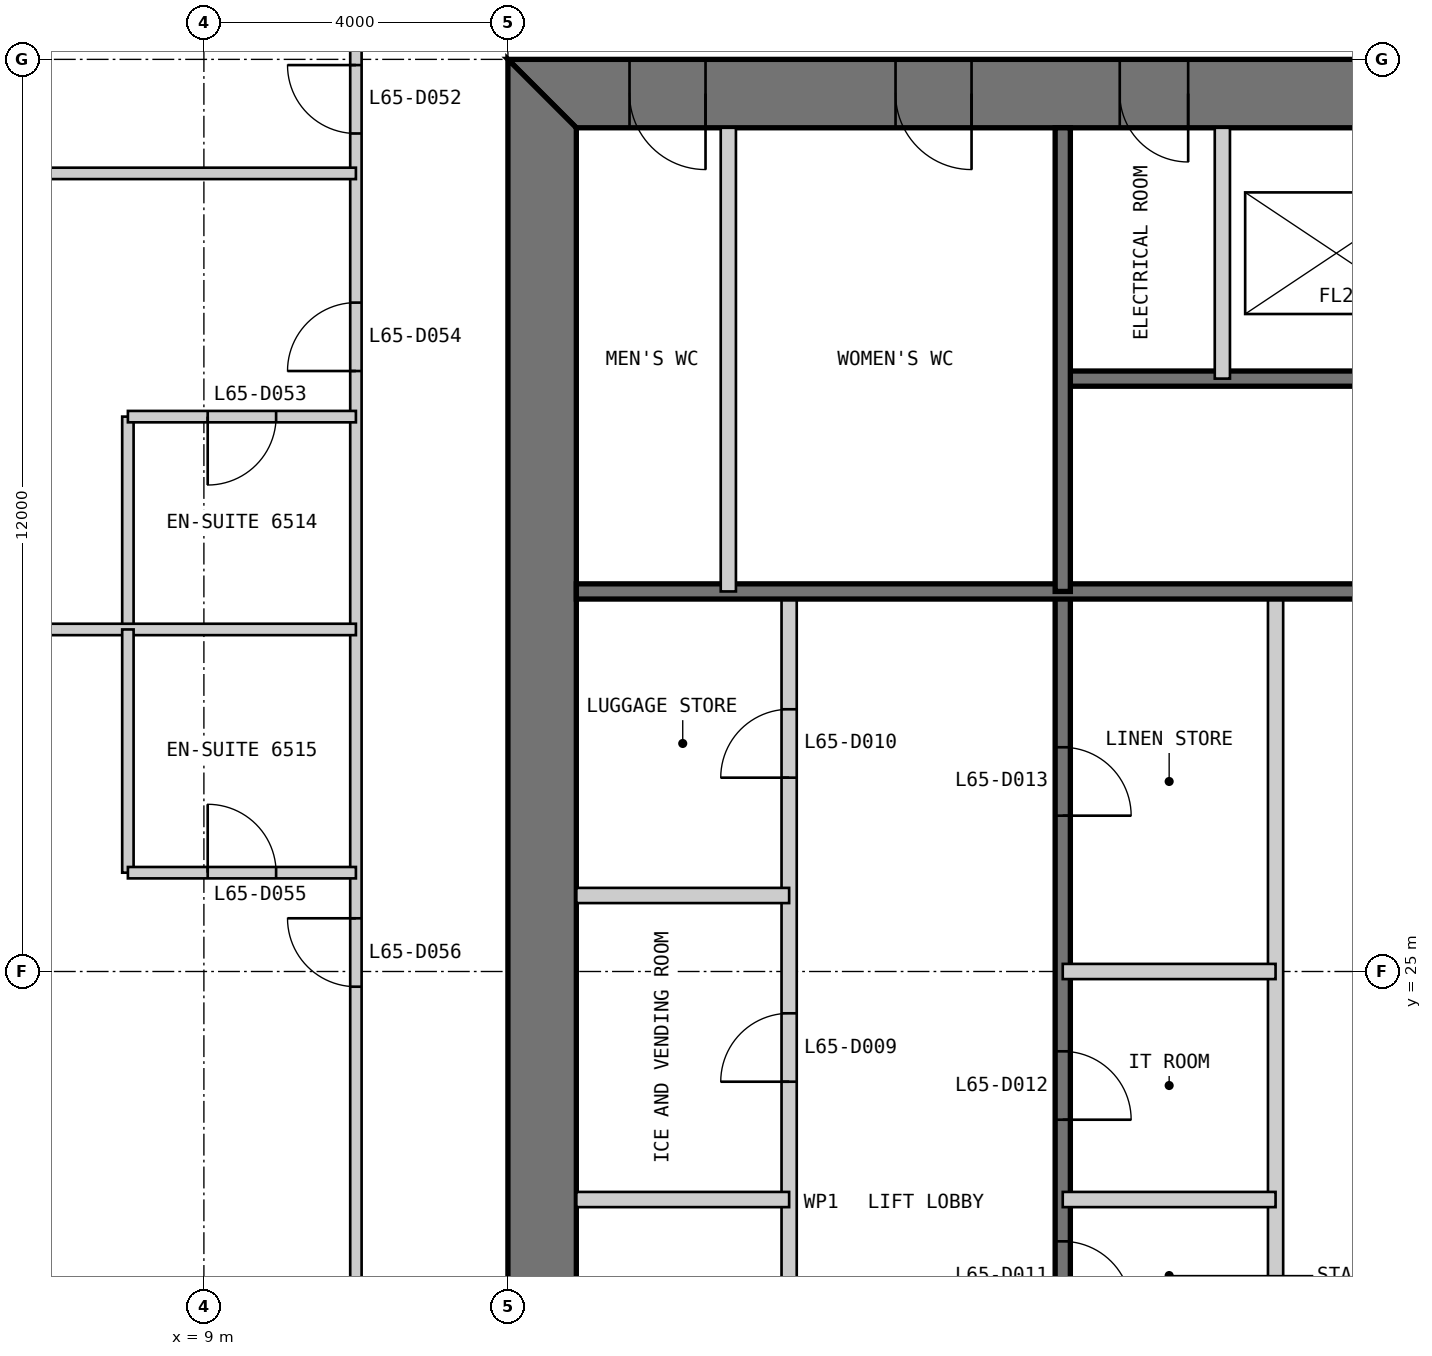
"""IFC4 building model, lengths in metres.
Left out: names, types, materials, properties, quantities, classifications, styles, units other than length and angle.
Written with IfcOpenShell. Run it as: python <this file> out.ifc"""

import sys

from ifc_helpers import new_model, si_unit, direction, frame, frame_2d, origin, place, context, subcontext, project, spatial, polyline, rectangle, outline, extrude, element, fill, save


model = new_model("IFC4")
c1 = context("Model", 3, precision=1e-05, world=origin(), true_north=direction((0.0, 1.0)))
c2 = subcontext(c1, "Body", "Model", "MODEL_VIEW")
j1 = project(units=[si_unit("LENGTHUNIT", "METRE"), si_unit("PLANEANGLEUNIT", "RADIAN")], contexts=[c1])
p1 = place(None, origin())
s1 = spatial("IfcSite", under=j1, at=p1, CompositionType="ELEMENT")
p2 = place(p1, origin())
s2 = spatial("IfcBuilding", under=s1, at=p2, CompositionType="ELEMENT")
p3 = place(p2, frame((0.0, 0.0, 273.0)))
s3 = spatial("IfcBuildingStorey", under=s2, at=p3, CompositionType="ELEMENT", Elevation=273.0)
p4 = place(p3, frame((37.0, 36.55, 0.0), z_axis=(0.0, 0.0, 1.0), x_axis=(-1.0, 0.0, 0.0)))
e1 = element("IfcWall", 1, at=p4, inside=s3, PredefinedType="SHEAR", context=c2, shape_type="SweptSolid", body=[
    extrude(outline(polyline([(0.0, -0.45), (24.0, -0.45), (23.1, 0.45), (0.9, 0.45), (0.0, -0.45)])), origin(), (0.0, 0.0, 1.0), 3.4),
])
p5 = place(p4, frame((4.9, 0.0, 0.0)))
e2 = element("IfcOpeningElement", 2, at=p5, cuts=e1, PredefinedType="OPENING", context=c2, shape_type="SweptSolid", body=[
    extrude(rectangle(XDim=1.0, YDim=2.2, at=frame_2d((0.5, 1.1))), frame((0.0, 0.46, 0.0), z_axis=(0.0, -1.0, 0.0), x_axis=(1.0, 0.0, 0.0)), (0.0, 0.0, 1.0), 0.92),
])
p6 = place(p4, frame((8.9, 0.0, 0.0)))
e3 = element("IfcOpeningElement", 3, at=p6, cuts=e1, PredefinedType="OPENING", context=c2, shape_type="SweptSolid", body=[
    extrude(rectangle(XDim=1.1, YDim=2.2, at=frame_2d((0.55, 1.1))), frame((0.0, 0.46, 0.0), z_axis=(0.0, -1.0, 0.0), x_axis=(1.0, 0.0, 0.0)), (0.0, 0.0, 1.0), 0.92),
])
p7 = place(p4, frame((15.05, 0.0, 0.0)))
e4 = element("IfcOpeningElement", 4, at=p7, cuts=e1, PredefinedType="OPENING", context=c2, shape_type="SweptSolid", body=[
    extrude(rectangle(XDim=0.9, YDim=2.2, at=frame_2d((0.45, 1.1))), frame((0.0, 0.46, 0.0), z_axis=(0.0, -1.0, 0.0), x_axis=(1.0, 0.0, 0.0)), (0.0, 0.0, 1.0), 0.92),
])
p8 = place(p4, frame((17.9, 0.0, 0.0)))
e5 = element("IfcOpeningElement", 5, at=p8, cuts=e1, PredefinedType="OPENING", context=c2, shape_type="SweptSolid", body=[
    extrude(rectangle(XDim=1.0, YDim=2.2, at=frame_2d((0.5, 1.1))), frame((0.0, 0.46, 0.0), z_axis=(0.0, -1.0, 0.0), x_axis=(1.0, 0.0, 0.0)), (0.0, 0.0, 1.0), 0.92),
])
p9 = place(p4, frame((21.4, 0.0, 0.0)))
e6 = element("IfcOpeningElement", 6, at=p9, cuts=e1, PredefinedType="OPENING", context=c2, shape_type="SweptSolid", body=[
    extrude(rectangle(XDim=1.0, YDim=2.2, at=frame_2d((0.5, 1.1))), frame((0.0, 0.46, 0.0), z_axis=(0.0, -1.0, 0.0), x_axis=(1.0, 0.0, 0.0)), (0.0, 0.0, 1.0), 0.92),
])
p10 = place(p3, frame((13.45, 36.1, 0.0), z_axis=(0.0, 0.0, 1.0), x_axis=(0.0, -1.0, 0.0)))
e7 = element("IfcWall", 7, at=p10, inside=s3, PredefinedType="SHEAR", context=c2, shape_type="SweptSolid", body=[
    extrude(outline(polyline([(-0.9, -0.45), (23.1, -0.45), (22.2, 0.45), (0.0, 0.45), (-0.9, -0.45)])), origin(), (0.0, 0.0, 1.0), 3.4),
])
p11 = place(p10, frame((20.2, 0.0, 0.0)))
e8 = element("IfcOpeningElement", 8, at=p11, cuts=e7, PredefinedType="OPENING", context=c2, shape_type="SweptSolid", body=[
    extrude(rectangle(XDim=1.0, YDim=2.2, at=frame_2d((0.5, 1.1))), frame((0.0, 0.46, 0.0), z_axis=(0.0, -1.0, 0.0), x_axis=(1.0, 0.0, 0.0)), (0.0, 0.0, 1.0), 0.92),
])
p12 = place(p10, frame((17.25, 0.0, 0.0)))
e9 = element("IfcOpeningElement", 9, at=p12, cuts=e7, PredefinedType="OPENING", context=c2, shape_type="SweptSolid", body=[
    extrude(rectangle(XDim=0.9, YDim=2.2, at=frame_2d((0.45, 1.1))), frame((0.0, 0.46, 0.0), z_axis=(0.0, -1.0, 0.0), x_axis=(1.0, 0.0, 0.0)), (0.0, 0.0, 1.0), 0.92),
])
p13 = place(p3, frame((16.7, 13.9, 0.0), z_axis=(0.0, 0.0, 1.0), x_axis=(0.0, 1.0, 0.0)))
e10 = element("IfcWall", 10, at=p13, inside=s3, PredefinedType="PARTITIONING", context=c2, shape_type="SweptSolid", body=[
    extrude(rectangle(XDim=16.1, YDim=0.2, at=frame_2d((8.05, 0.0))), origin(), (0.0, 0.0, 1.0), 3.2),
])
p14 = place(p13, frame((9.65, 0.0, 0.0)))
e11 = element("IfcOpeningElement", 11, at=p14, cuts=e10, PredefinedType="OPENING", context=c2, shape_type="SweptSolid", body=[
    extrude(rectangle(XDim=0.9, YDim=2.2, at=frame_2d((0.45, 1.1))), frame((0.0, 0.11, 0.0), z_axis=(0.0, -1.0, 0.0), x_axis=(1.0, 0.0, 0.0)), (0.0, 0.0, 1.0), 0.22),
])
p15 = place(p13, frame((13.65, 0.0, 0.0)))
e12 = element("IfcOpeningElement", 12, at=p15, cuts=e10, PredefinedType="OPENING", context=c2, shape_type="SweptSolid", body=[
    extrude(rectangle(XDim=0.9, YDim=2.2, at=frame_2d((0.45, 1.1))), frame((0.0, 0.11, 0.0), z_axis=(0.0, -1.0, 0.0), x_axis=(1.0, 0.0, 0.0)), (0.0, 0.0, 1.0), 0.22),
])
p16 = place(p3, frame((20.3, 13.9, 0.0), z_axis=(0.0, 0.0, 1.0), x_axis=(0.0, 1.0, 0.0)))
e13 = element("IfcWall", 13, at=p16, inside=s3, PredefinedType="SOLIDWALL", context=c2, shape_type="SweptSolid", body=[
    extrude(rectangle(XDim=16.1, YDim=0.2, at=frame_2d((8.05, 0.0))), origin(), (0.0, 0.0, 1.0), 3.2),
])
p17 = place(p16, frame((6.65, 0.0, 0.0)))
e14 = element("IfcOpeningElement", 14, at=p17, cuts=e13, PredefinedType="OPENING", context=c2, shape_type="SweptSolid", body=[
    extrude(rectangle(XDim=0.9, YDim=2.2, at=frame_2d((0.45, 1.1))), frame((0.0, 0.11, 0.0), z_axis=(0.0, -1.0, 0.0), x_axis=(1.0, 0.0, 0.0)), (0.0, 0.0, 1.0), 0.22),
])
p18 = place(p16, frame((9.15, 0.0, 0.0)))
e15 = element("IfcOpeningElement", 15, at=p18, cuts=e13, PredefinedType="OPENING", context=c2, shape_type="SweptSolid", body=[
    extrude(rectangle(XDim=0.9, YDim=2.2, at=frame_2d((0.45, 1.1))), frame((0.0, 0.11, 0.0), z_axis=(0.0, -1.0, 0.0), x_axis=(1.0, 0.0, 0.0)), (0.0, 0.0, 1.0), 0.22),
])
p19 = place(p16, frame((13.15, 0.0, 0.0)))
e16 = element("IfcOpeningElement", 16, at=p19, cuts=e13, PredefinedType="OPENING", context=c2, shape_type="SweptSolid", body=[
    extrude(rectangle(XDim=0.9, YDim=2.2, at=frame_2d((0.45, 1.1))), frame((0.0, 0.11, 0.0), z_axis=(0.0, -1.0, 0.0), x_axis=(1.0, 0.0, 0.0)), (0.0, 0.0, 1.0), 0.22),
])
p20 = place(p3, frame((23.1, 20.0, 0.0), z_axis=(0.0, 0.0, 1.0), x_axis=(0.0, 1.0, 0.0)))
e17 = element("IfcWall", 17, at=p20, inside=s3, PredefinedType="PARTITIONING", context=c2, shape_type="SweptSolid", body=[
    extrude(rectangle(XDim=10.0, YDim=0.2, at=frame_2d((5.0, 0.0))), origin(), (0.0, 0.0, 1.0), 3.2),
])
for number, where, z_axis, x_axis in (
    (18, (13.9, 22.0, 0.0), (0.0, 0.0, 1.0), (1.0, 0.0, 0.0)),
    (19, (13.9, 26.0, 0.0), (0.0, 0.0, 1.0), (1.0, 0.0, 0.0)),
    (20, (20.3, 22.0, 0.0), (0.0, 0.0, 1.0), (1.0, 0.0, 0.0)),
    (21, (20.3, 25.0, 0.0), (0.0, 0.0, 1.0), (1.0, 0.0, 0.0)),
):
    element("IfcWall", number, at=place(p3, frame(where, z_axis=z_axis, x_axis=x_axis)), inside=s3, PredefinedType="PARTITIONING", context=c2, shape_type="SweptSolid", body=[
        extrude(rectangle(XDim=2.8, YDim=0.2, at=frame_2d((1.4, 0.0))), origin(), (0.0, 0.0, 1.0), 3.2),
    ])
p21 = place(p3, frame((29.7, 32.8, 0.0), z_axis=(0.0, 0.0, 1.0), x_axis=(-1.0, 0.0, 0.0)))
e22 = element("IfcWall", 22, at=p21, inside=s3, PredefinedType="SOLIDWALL", context=c2, shape_type="SweptSolid", body=[
    extrude(rectangle(XDim=9.4, YDim=0.2, at=frame_2d((4.7, 0.0))), origin(), (0.0, 0.0, 1.0), 3.2),
])
p22 = place(p21, frame((0.25, 0.0, 0.0)))
e23 = element("IfcOpeningElement", 23, at=p22, cuts=e22, PredefinedType="OPENING", context=c2, shape_type="SweptSolid", body=[
    extrude(rectangle(XDim=1.0, YDim=2.2, at=frame_2d((0.5, 1.1))), frame((0.0, 0.11, 0.0), z_axis=(0.0, -1.0, 0.0), x_axis=(1.0, 0.0, 0.0)), (0.0, 0.0, 1.0), 0.22),
])
p23 = place(p3, frame((29.7, 30.0, 0.0), z_axis=(0.0, 0.0, 1.0), x_axis=(-1.0, 0.0, 0.0)))
e24 = element("IfcWall", 24, at=p23, inside=s3, PredefinedType="SOLIDWALL", context=c2, shape_type="SweptSolid", body=[
    extrude(rectangle(XDim=15.8, YDim=0.2, at=frame_2d((7.9, 0.0))), origin(), (0.0, 0.0, 1.0), 3.2),
])
p24 = place(p3, frame((22.4, 36.1, 0.0), z_axis=(0.0, 0.0, 1.0), x_axis=(0.0, -1.0, 0.0)))
e25 = element("IfcWall", 25, at=p24, inside=s3, PredefinedType="PARTITIONING", context=c2, shape_type="SweptSolid", body=[
    extrude(rectangle(XDim=3.3, YDim=0.2, at=frame_2d((1.65, 0.0))), origin(), (0.0, 0.0, 1.0), 3.2),
])
p25 = place(p3, frame((20.3, 36.1, 0.0), z_axis=(0.0, 0.0, 1.0), x_axis=(0.0, -1.0, 0.0)))
e26 = element("IfcWall", 26, at=p25, inside=s3, PredefinedType="SOLIDWALL", context=c2, shape_type="SweptSolid", body=[
    extrude(rectangle(XDim=6.1, YDim=0.2, at=frame_2d((3.05, 0.0))), origin(), (0.0, 0.0, 1.0), 3.2),
])
p26 = place(p3, frame((15.9, 36.1, 0.0), z_axis=(0.0, 0.0, 1.0), x_axis=(0.0, -1.0, 0.0)))
e27 = element("IfcWall", 27, at=p26, inside=s3, PredefinedType="PARTITIONING", context=c2, shape_type="SweptSolid", body=[
    extrude(rectangle(XDim=6.1, YDim=0.2, at=frame_2d((3.05, 0.0))), origin(), (0.0, 0.0, 1.0), 3.2),
])
p27 = place(p3, frame((11.0, 39.0, 0.0), z_axis=(0.0, 0.0, 1.0), x_axis=(0.0, -1.0, 0.0)))
e28 = element("IfcWall", 28, at=p27, inside=s3, PredefinedType="PARTITIONING", context=c2, shape_type="SweptSolid", body=[
    extrude(rectangle(XDim=28.0, YDim=0.15, at=frame_2d((14.0, 0.0))), origin(), (0.0, 0.0, 1.0), 2.844),
])
p28 = place(p27, frame((2.075, 0.0, 0.0)))
e29 = element("IfcOpeningElement", 29, at=p28, cuts=e28, PredefinedType="OPENING", context=c2, shape_type="SweptSolid", body=[
    extrude(rectangle(XDim=0.9, YDim=2.1, at=frame_2d((0.45, 1.05))), frame((0.0, 0.085, 0.0), z_axis=(0.0, -1.0, 0.0), x_axis=(1.0, 0.0, 0.0)), (0.0, 0.0, 1.0), 0.17),
])
p29 = place(p27, frame((5.2, 0.0, 0.0)))
e30 = element("IfcOpeningElement", 30, at=p29, cuts=e28, PredefinedType="OPENING", context=c2, shape_type="SweptSolid", body=[
    extrude(rectangle(XDim=0.9, YDim=2.1, at=frame_2d((0.45, 1.05))), frame((0.0, 0.085, 0.0), z_axis=(0.0, -1.0, 0.0), x_axis=(1.0, 0.0, 0.0)), (0.0, 0.0, 1.0), 0.17),
])
p30 = place(p27, frame((13.3, 0.0, 0.0)))
e31 = element("IfcOpeningElement", 31, at=p30, cuts=e28, PredefinedType="OPENING", context=c2, shape_type="SweptSolid", body=[
    extrude(rectangle(XDim=0.9, YDim=2.1, at=frame_2d((0.45, 1.05))), frame((0.0, 0.085, 0.0), z_axis=(0.0, -1.0, 0.0), x_axis=(1.0, 0.0, 0.0)), (0.0, 0.0, 1.0), 0.17),
])
p31 = place(p27, frame((24.9, 0.0, 0.0)))
e32 = element("IfcOpeningElement", 32, at=p31, cuts=e28, PredefinedType="OPENING", context=c2, shape_type="SweptSolid", body=[
    extrude(rectangle(XDim=0.9, YDim=2.1, at=frame_2d((0.45, 1.05))), frame((0.0, 0.085, 0.0), z_axis=(0.0, -1.0, 0.0), x_axis=(1.0, 0.0, 0.0)), (0.0, 0.0, 1.0), 0.17),
])
p32 = place(p3, frame((0.15, 35.5, 0.0), z_axis=(0.0, 0.0, 1.0), x_axis=(1.0, 0.0, 0.0)))
e33 = element("IfcWall", 33, at=p32, inside=s3, PredefinedType="PARTITIONING", context=c2, shape_type="SweptSolid", body=[
    extrude(rectangle(XDim=10.85, YDim=0.15, at=frame_2d((5.425, 0.0))), origin(), (0.0, 0.0, 1.0), 3.25),
])
p33 = place(p3, frame((8.0, 32.3, 0.0), z_axis=(0.0, 0.0, 1.0), x_axis=(0.0, -1.0, 0.0)))
e34 = element("IfcWall", 34, at=p33, inside=s3, PredefinedType="PARTITIONING", context=c2, shape_type="SweptSolid", body=[
    extrude(rectangle(XDim=2.8, YDim=0.15, at=frame_2d((1.4, 0.0))), origin(), (0.0, 0.0, 1.0), 3.25),
])
p34 = place(p3, frame((8.0, 32.3, 0.0), z_axis=(0.0, 0.0, 1.0), x_axis=(1.0, 0.0, 0.0)))
e35 = element("IfcWall", 35, at=p34, inside=s3, PredefinedType="PARTITIONING", context=c2, shape_type="SweptSolid", body=[
    extrude(rectangle(XDim=3.0, YDim=0.15, at=frame_2d((1.5, 0.0))), origin(), (0.0, 0.0, 1.0), 3.25),
])
p35 = place(p34, frame((1.05, 0.0, 0.0)))
e36 = element("IfcOpeningElement", 36, at=p35, cuts=e35, PredefinedType="OPENING", context=c2, shape_type="SweptSolid", body=[
    extrude(rectangle(XDim=0.9, YDim=2.1, at=frame_2d((0.45, 1.05))), frame((0.0, 0.085, 0.0), z_axis=(0.0, -1.0, 0.0), x_axis=(1.0, 0.0, 0.0)), (0.0, 0.0, 1.0), 0.17),
])
p36 = place(p3, frame((0.15, 29.5, 0.0), z_axis=(0.0, 0.0, 1.0), x_axis=(1.0, 0.0, 0.0)))
e37 = element("IfcWall", 37, at=p36, inside=s3, PredefinedType="PARTITIONING", context=c2, shape_type="SweptSolid", body=[
    extrude(rectangle(XDim=10.85, YDim=0.15, at=frame_2d((5.425, 0.0))), origin(), (0.0, 0.0, 1.0), 3.25),
])
p37 = place(p3, frame((8.0, 29.5, 0.0), z_axis=(0.0, 0.0, 1.0), x_axis=(0.0, -1.0, 0.0)))
e38 = element("IfcWall", 38, at=p37, inside=s3, PredefinedType="PARTITIONING", context=c2, shape_type="SweptSolid", body=[
    extrude(rectangle(XDim=3.2, YDim=0.15, at=frame_2d((1.6, 0.0))), origin(), (0.0, 0.0, 1.0), 3.25),
])
p38 = place(p3, frame((8.0, 26.3, 0.0), z_axis=(0.0, 0.0, 1.0), x_axis=(1.0, 0.0, 0.0)))
e39 = element("IfcWall", 39, at=p38, inside=s3, PredefinedType="PARTITIONING", context=c2, shape_type="SweptSolid", body=[
    extrude(rectangle(XDim=3.0, YDim=0.15, at=frame_2d((1.5, 0.0))), origin(), (0.0, 0.0, 1.0), 3.25),
])
p39 = place(p38, frame((1.05, 0.0, 0.0)))
e40 = element("IfcOpeningElement", 40, at=p39, cuts=e39, PredefinedType="OPENING", context=c2, shape_type="SweptSolid", body=[
    extrude(rectangle(XDim=0.9, YDim=2.1, at=frame_2d((0.45, 1.05))), frame((0.0, 0.085, 0.0), z_axis=(0.0, -1.0, 0.0), x_axis=(1.0, 0.0, 0.0)), (0.0, 0.0, 1.0), 0.17),
])
p40 = place(p14, origin())
e41 = element("IfcDoor", 41, at=p40, inside=s3, OperationType="SINGLE_SWING_LEFT", PredefinedType="DOOR", context=c2, shape_type="SweptSolid", body=[
    extrude(rectangle(XDim=0.9, YDim=2.2, at=frame_2d((0.45, 1.1))), frame((0.0, 0.025, 0.0), z_axis=(0.0, -1.0, 0.0), x_axis=(1.0, 0.0, 0.0)), (0.0, 0.0, 1.0), 0.05),
])
fill(e11, e41)
p41 = place(p15, origin())
e42 = element("IfcDoor", 42, at=p41, inside=s3, OperationType="SINGLE_SWING_LEFT", PredefinedType="DOOR", context=c2, shape_type="SweptSolid", body=[
    extrude(rectangle(XDim=0.9, YDim=2.2, at=frame_2d((0.45, 1.1))), frame((0.0, 0.025, 0.0), z_axis=(0.0, -1.0, 0.0), x_axis=(1.0, 0.0, 0.0)), (0.0, 0.0, 1.0), 0.05),
])
fill(e12, e42)
p42 = place(p17, frame((0.9, 0.0, 0.0), z_axis=(0.0, 0.0, 1.0), x_axis=(-1.0, 0.0, 0.0)))
e43 = element("IfcDoor", 43, at=p42, inside=s3, OperationType="SINGLE_SWING_RIGHT", PredefinedType="DOOR", context=c2, shape_type="SweptSolid", body=[
    extrude(rectangle(XDim=0.9, YDim=2.2, at=frame_2d((0.45, 1.1))), frame((0.0, 0.025, 0.0), z_axis=(0.0, -1.0, 0.0), x_axis=(1.0, 0.0, 0.0)), (0.0, 0.0, 1.0), 0.05),
])
fill(e14, e43)
p43 = place(p18, frame((0.9, 0.0, 0.0), z_axis=(0.0, 0.0, 1.0), x_axis=(-1.0, 0.0, 0.0)))
e44 = element("IfcDoor", 44, at=p43, inside=s3, OperationType="SINGLE_SWING_RIGHT", PredefinedType="DOOR", context=c2, shape_type="SweptSolid", body=[
    extrude(rectangle(XDim=0.9, YDim=2.2, at=frame_2d((0.45, 1.1))), frame((0.0, 0.025, 0.0), z_axis=(0.0, -1.0, 0.0), x_axis=(1.0, 0.0, 0.0)), (0.0, 0.0, 1.0), 0.05),
])
fill(e15, e44)
p44 = place(p19, frame((0.9, 0.0, 0.0), z_axis=(0.0, 0.0, 1.0), x_axis=(-1.0, 0.0, 0.0)))
e45 = element("IfcDoor", 45, at=p44, inside=s3, OperationType="SINGLE_SWING_RIGHT", PredefinedType="DOOR", context=c2, shape_type="SweptSolid", body=[
    extrude(rectangle(XDim=0.9, YDim=2.2, at=frame_2d((0.45, 1.1))), frame((0.0, 0.025, 0.0), z_axis=(0.0, -1.0, 0.0), x_axis=(1.0, 0.0, 0.0)), (0.0, 0.0, 1.0), 0.05),
])
fill(e16, e45)
p45 = place(p7, origin())
e46 = element("IfcDoor", 46, at=p45, inside=s3, OperationType="SINGLE_SWING_LEFT", PredefinedType="DOOR", context=c2, shape_type="SweptSolid", body=[
    extrude(rectangle(XDim=0.9, YDim=2.2, at=frame_2d((0.45, 1.1))), frame((0.0, 0.025, 0.0), z_axis=(0.0, -1.0, 0.0), x_axis=(1.0, 0.0, 0.0)), (0.0, 0.0, 1.0), 0.05),
    extrude(outline(polyline([(0.0, 0.0), (0.04, 0.0), (0.04, 2.16), (0.86, 2.16), (0.86, 0.0), (0.9, 0.0), (0.9, 2.2), (0.0, 2.2), (0.0, 0.0)])), frame((0.0, 0.3, 0.0), z_axis=(0.0, -1.0, 0.0), x_axis=(1.0, 0.0, 0.0)), (0.0, 0.0, 1.0), 0.6),
])
fill(e4, e46)
p46 = place(p8, origin())
e47 = element("IfcDoor", 47, at=p46, inside=s3, OperationType="SINGLE_SWING_LEFT", PredefinedType="DOOR", context=c2, shape_type="SweptSolid", body=[
    extrude(rectangle(XDim=1.0, YDim=2.2, at=frame_2d((0.5, 1.1))), frame((0.0, 0.025, 0.0), z_axis=(0.0, -1.0, 0.0), x_axis=(1.0, 0.0, 0.0)), (0.0, 0.0, 1.0), 0.05),
    extrude(outline(polyline([(0.0, 0.0), (0.04, 0.0), (0.04, 2.16), (0.96, 2.16), (0.96, 0.0), (1.0, 0.0), (1.0, 2.2), (0.0, 2.2), (0.0, 0.0)])), frame((0.0, 0.3, 0.0), z_axis=(0.0, -1.0, 0.0), x_axis=(1.0, 0.0, 0.0)), (0.0, 0.0, 1.0), 0.6),
])
fill(e5, e47)
p47 = place(p9, origin())
e48 = element("IfcDoor", 48, at=p47, inside=s3, OperationType="SINGLE_SWING_LEFT", PredefinedType="DOOR", context=c2, shape_type="SweptSolid", body=[
    extrude(rectangle(XDim=1.0, YDim=2.2, at=frame_2d((0.5, 1.1))), frame((0.0, 0.025, 0.0), z_axis=(0.0, -1.0, 0.0), x_axis=(1.0, 0.0, 0.0)), (0.0, 0.0, 1.0), 0.05),
    extrude(outline(polyline([(0.0, 0.0), (0.04, 0.0), (0.04, 2.16), (0.96, 2.16), (0.96, 0.0), (1.0, 0.0), (1.0, 2.2), (0.0, 2.2), (0.0, 0.0)])), frame((0.0, 0.3, 0.0), z_axis=(0.0, -1.0, 0.0), x_axis=(1.0, 0.0, 0.0)), (0.0, 0.0, 1.0), 0.6),
])
fill(e6, e48)
p48 = place(p28, frame((0.9, 0.0, 0.0), z_axis=(0.0, 0.0, 1.0), x_axis=(-1.0, 0.0, 0.0)))
e49 = element("IfcDoor", 49, at=p48, inside=s3, OperationType="SINGLE_SWING_RIGHT", PredefinedType="DOOR", context=c2, shape_type="SweptSolid", body=[
    extrude(rectangle(XDim=0.9, YDim=2.1, at=frame_2d((0.45, 1.05))), frame((0.0, 0.025, 0.0), z_axis=(0.0, -1.0, 0.0), x_axis=(1.0, 0.0, 0.0)), (0.0, 0.0, 1.0), 0.05),
])
fill(e29, e49)
p49 = place(p35, frame((0.9, 0.0, 0.0), z_axis=(0.0, 0.0, 1.0), x_axis=(-1.0, 0.0, 0.0)))
e50 = element("IfcDoor", 50, at=p49, inside=s3, OperationType="SINGLE_SWING_RIGHT", PredefinedType="DOOR", context=c2, shape_type="SweptSolid", body=[
    extrude(rectangle(XDim=0.9, YDim=2.1, at=frame_2d((0.45, 1.05))), frame((0.0, 0.025, 0.0), z_axis=(0.0, -1.0, 0.0), x_axis=(1.0, 0.0, 0.0)), (0.0, 0.0, 1.0), 0.05),
])
fill(e36, e50)
p50 = place(p29, frame((0.9, 0.0, 0.0), z_axis=(0.0, 0.0, 1.0), x_axis=(-1.0, 0.0, 0.0)))
e51 = element("IfcDoor", 51, at=p50, inside=s3, OperationType="SINGLE_SWING_LEFT", PredefinedType="DOOR", context=c2, shape_type="SweptSolid", body=[
    extrude(rectangle(XDim=0.9, YDim=2.1, at=frame_2d((0.45, 1.05))), frame((0.0, 0.025, 0.0), z_axis=(0.0, -1.0, 0.0), x_axis=(1.0, 0.0, 0.0)), (0.0, 0.0, 1.0), 0.05),
])
fill(e30, e51)
p51 = place(p39, origin())
e52 = element("IfcDoor", 52, at=p51, inside=s3, OperationType="SINGLE_SWING_LEFT", PredefinedType="DOOR", context=c2, shape_type="SweptSolid", body=[
    extrude(rectangle(XDim=0.9, YDim=2.1, at=frame_2d((0.45, 1.05))), frame((0.0, 0.025, 0.0), z_axis=(0.0, -1.0, 0.0), x_axis=(1.0, 0.0, 0.0)), (0.0, 0.0, 1.0), 0.05),
])
fill(e40, e52)
p52 = place(p30, frame((0.9, 0.0, 0.0), z_axis=(0.0, 0.0, 1.0), x_axis=(-1.0, 0.0, 0.0)))
e53 = element("IfcDoor", 53, at=p52, inside=s3, OperationType="SINGLE_SWING_RIGHT", PredefinedType="DOOR", context=c2, shape_type="SweptSolid", body=[
    extrude(rectangle(XDim=0.9, YDim=2.1, at=frame_2d((0.45, 1.05))), frame((0.0, 0.025, 0.0), z_axis=(0.0, -1.0, 0.0), x_axis=(1.0, 0.0, 0.0)), (0.0, 0.0, 1.0), 0.05),
])
fill(e31, e53)
save(model, sys.argv[1])
